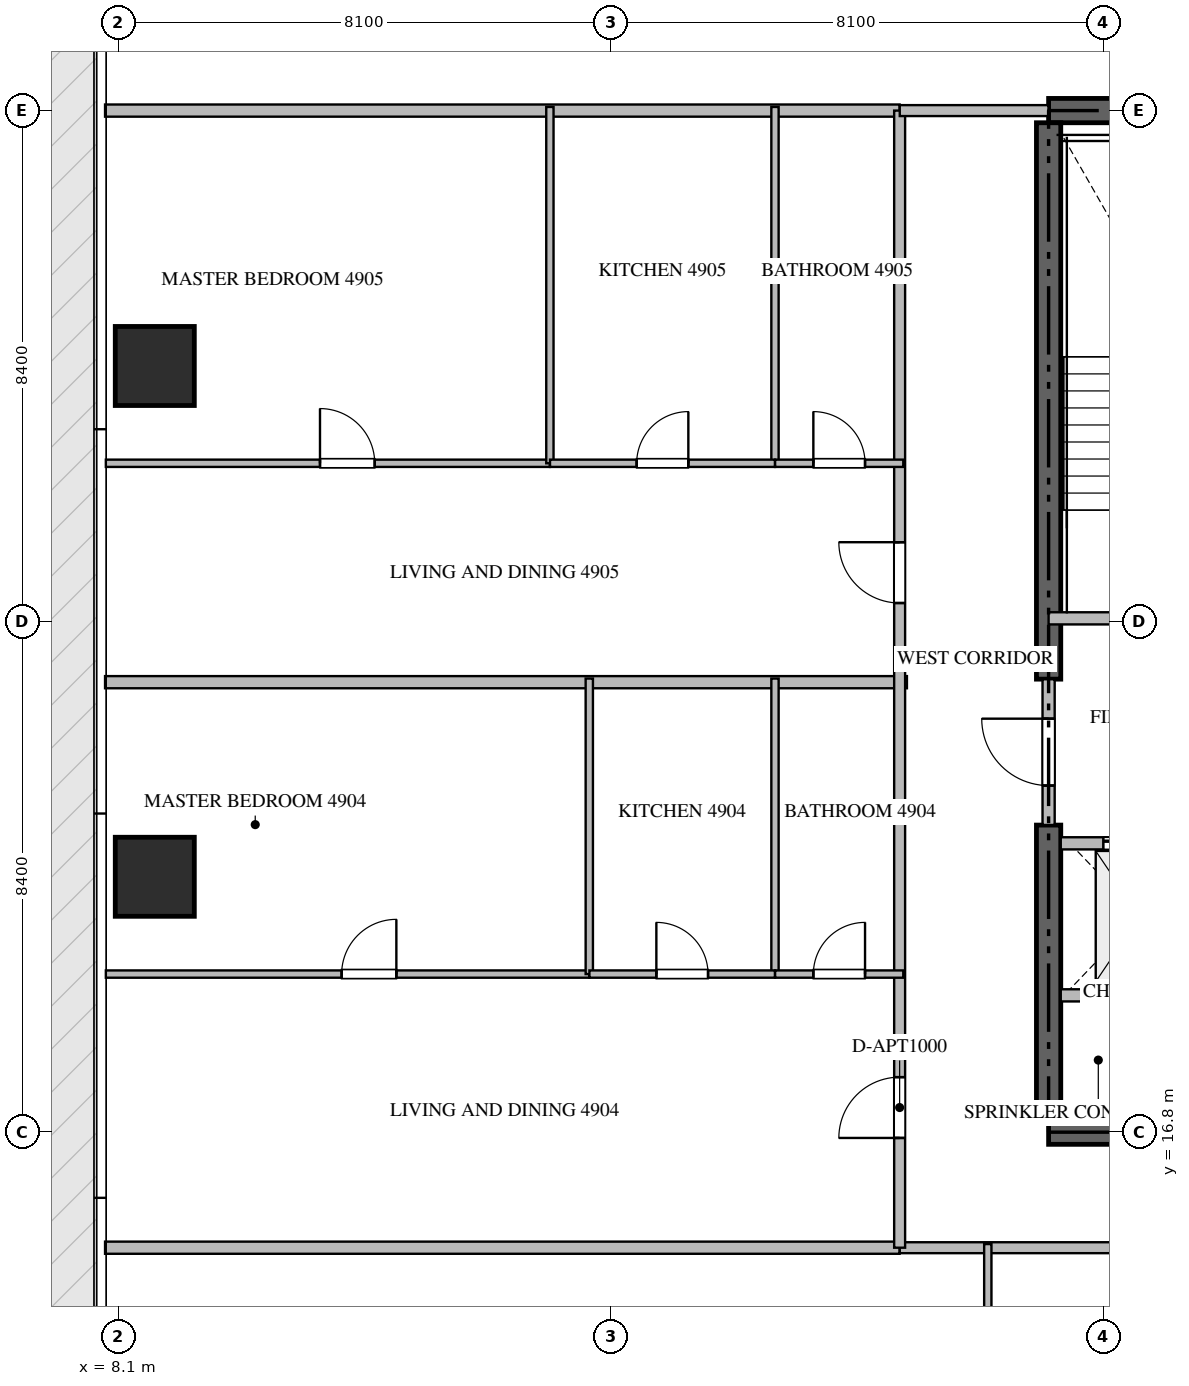
"""IFC4 building model, lengths in metres.
Left out: names, types, materials, properties, quantities, classifications, styles, units other than length and angle.
Written with IfcOpenShell. Run it as: python <this file> out.ifc"""

import sys

from ifc_helpers import new_model, si_unit, direction, frame, frame_2d, origin, origin_2d, place, context, subcontext, project, spatial, rectangle, extrude, source, transform, mapped, element, fill, save


model = new_model("IFC4")
c1 = context("Model", 3, precision=1e-05, world=origin(), true_north=direction((0.0, 1.0)))
c2 = subcontext(c1, "Body", "Model", "MODEL_VIEW")
j1 = project(units=[si_unit("LENGTHUNIT", "METRE"), si_unit("PLANEANGLEUNIT", "RADIAN")], contexts=[c1])
p1 = place(None, origin())
s1 = spatial("IfcSite", under=j1, at=p1, CompositionType="ELEMENT")
p2 = place(p1, origin())
s2 = spatial("IfcBuilding", under=s1, at=p2, CompositionType="ELEMENT")
p3 = place(p2, frame((0.0, 0.0, 195.15)))
s3 = spatial("IfcBuildingStorey", under=s2, at=p3, CompositionType="ELEMENT", Elevation=195.15)
for number, where, z_axis, x_axis in (
    (1, (23.4, 16.8, -0.26), (0.0, 0.0, 1.0), (1.0, 0.0, 0.0)),
    (2, (41.4, 33.6, -0.26), (0.0, 0.0, 1.0), (-1.0, 0.0, 0.0)),
):
    element("IfcWall", number, at=place(p3, frame(where, z_axis=z_axis, x_axis=x_axis)), inside=s3, PredefinedType="SHEAR", context=c2, shape_type="SweptSolid", body=[
        extrude(rectangle(XDim=18.0, YDim=0.4, at=frame_2d((9.0, 0.0))), origin(), (0.0, 0.0, 1.0), 3.568),
    ])
p4 = place(p3, frame((23.4, 17.0, -0.26), z_axis=(0.0, 0.0, 1.0), x_axis=(0.0, 1.0, 0.0)))
e3 = element("IfcWall", 3, at=p4, inside=s3, PredefinedType="SHEAR", context=c2, shape_type="SweptSolid", body=[
    extrude(rectangle(XDim=4.85, YDim=0.4, at=frame_2d((2.425, 0.0))), origin(), (0.0, 0.0, 1.0), 3.568),
])
p5 = place(p3, frame((23.4, 24.25, -0.26), z_axis=(0.0, 0.0, 1.0), x_axis=(0.0, 1.0, 0.0)))
e4 = element("IfcWall", 4, at=p5, inside=s3, PredefinedType="SHEAR", context=c2, shape_type="SweptSolid", body=[
    extrude(rectangle(XDim=9.15, YDim=0.4, at=frame_2d((4.575, 0.0))), origin(), (0.0, 0.0, 1.0), 3.568),
])
m1 = source(origin(), c2, "Body", "SweptSolid", [
    extrude(rectangle(XDim=1.3, YDim=1.3, at=origin_2d()), origin(), (0.0, 0.0, 1.0), 3.57),
])
for number, where, z_axis, x_axis in (
    (5, (8.7, 21.0, -0.26), (0.0, 0.0, 1.0), (1.0, 0.0, 0.0)),
    (6, (8.7, 29.4, -0.26), (0.0, 0.0, 1.0), (1.0, 0.0, 0.0)),
):
    element("IfcColumn", number, at=place(p3, frame(where, z_axis=z_axis, x_axis=x_axis)), inside=s3, PredefinedType="COLUMN", context=c2, shape_type="MappedRepresentation", body=[
        mapped(m1, transform((0.0, 0.0, 0.0), scale=1.0)),
    ])
p6 = place(p3, frame((23.4, 25.25, 0.0), z_axis=(0.0, 0.0, 1.0), x_axis=(1.0, 0.0, 0.0)))
e7 = element("IfcWall", 7, at=p6, inside=s3, PredefinedType="STANDARD", context=c2, shape_type="SweptSolid", body=[
    extrude(rectangle(XDim=4.45, YDim=0.2, at=frame_2d((2.225, 0.0))), origin(), (0.0, 0.0, 1.0), 3.31),
])
p7 = place(p6, frame((1.65, 0.0, 0.0)))
e8 = element("IfcOpeningElement", 8, at=p7, cuts=e7, PredefinedType="OPENING", context=c2, shape_type="SweptSolid", body=[
    extrude(rectangle(XDim=1.1, YDim=2.15, at=frame_2d((0.55, 1.075))), frame((0.0, 0.11, 0.0), z_axis=(0.0, -1.0, 0.0), x_axis=(1.0, 0.0, 0.0)), (0.0, 0.0, 1.0), 0.22),
])
p8 = place(p3, frame((23.6, 21.55, 0.0), z_axis=(0.0, 0.0, 1.0), x_axis=(1.0, 0.0, 0.0)))
e9 = element("IfcWall", 9, at=p8, inside=s3, PredefinedType="STANDARD", context=c2, shape_type="SweptSolid", body=[
    extrude(rectangle(XDim=2.45, YDim=0.2, at=frame_2d((1.225, 0.0))), origin(), (0.0, 0.0, 1.0), 3.31),
])
p9 = place(p8, frame((0.7, 0.0, 0.0)))
e10 = element("IfcOpeningElement", 10, at=p9, cuts=e9, PredefinedType="OPENING", context=c2, shape_type="SweptSolid", body=[
    extrude(rectangle(XDim=1.2, YDim=2.2, at=frame_2d((0.6, 1.1))), frame((0.0, 0.11, 0.0), z_axis=(0.0, -1.0, 0.0), x_axis=(1.0, 0.0, 0.0)), (0.0, 0.0, 1.0), 0.22),
])
p10 = place(p3, frame((23.6, 19.05, 0.0), z_axis=(0.0, 0.0, 1.0), x_axis=(1.0, 0.0, 0.0)))
e11 = element("IfcWall", 11, at=p10, inside=s3, PredefinedType="STANDARD", context=c2, shape_type="SweptSolid", body=[
    extrude(rectangle(XDim=2.45, YDim=0.2, at=frame_2d((1.225, 0.0))), origin(), (0.0, 0.0, 1.0), 3.31),
])
p11 = place(p3, frame((23.4, 21.852, 0.0), z_axis=(0.0, 0.0, 1.0), x_axis=(0.0, 1.0, 0.0)))
e12 = element("IfcWall", 12, at=p11, inside=s3, PredefinedType="STANDARD", context=c2, shape_type="SweptSolid", body=[
    extrude(rectangle(XDim=2.396, YDim=0.2, at=frame_2d((1.198, 0.0))), origin(), (0.0, 0.0, 1.0), 3.31),
])
p12 = place(p11, frame((0.648, 0.0, 0.0)))
e13 = element("IfcOpeningElement", 13, at=p12, cuts=e12, PredefinedType="OPENING", context=c2, shape_type="SweptSolid", body=[
    extrude(rectangle(XDim=1.1, YDim=2.15, at=frame_2d((0.55, 1.075))), frame((0.0, 0.11, 0.0), z_axis=(0.0, -1.0, 0.0), x_axis=(1.0, 0.0, 0.0)), (0.0, 0.0, 1.0), 0.22),
])
p13 = place(p3, frame((7.882, 24.2, 0.0), z_axis=(0.0, 0.0, 1.0), x_axis=(1.0, 0.0, 0.0)))
e14 = element("IfcWall", 14, at=p13, inside=s3, PredefinedType="PARTITIONING", context=c2, shape_type="SweptSolid", body=[
    extrude(rectangle(XDim=13.188, YDim=0.2, at=frame_2d((6.594, 0.0))), origin(), (0.0, 0.0, 1.0), 3.31),
])
for number, where, z_axis, x_axis in (
    (15, (7.882, 14.9, 0.0), (0.0, 0.0, 1.0), (1.0, 0.0, 0.0)),
    (16, (7.882, 33.6, 0.0), (0.0, 0.0, 1.0), (1.0, 0.0, 0.0)),
):
    element("IfcWall", number, at=place(p3, frame(where, z_axis=z_axis, x_axis=x_axis)), inside=s3, PredefinedType="PARTITIONING", context=c2, shape_type="SweptSolid", body=[
        extrude(rectangle(XDim=13.068, YDim=0.2, at=frame_2d((6.534, 0.0))), origin(), (0.0, 0.0, 1.0), 3.31),
    ])
p14 = place(p3, frame((20.952, 14.9, 0.0), z_axis=(0.0, 0.0, 1.0), x_axis=(1.0, 0.0, 0.0)))
e17 = element("IfcWall", 17, at=p14, inside=s3, PredefinedType="PARTITIONING", context=c2, shape_type="SweptSolid", body=[
    extrude(rectangle(XDim=22.896, YDim=0.18, at=frame_2d((11.448, 0.0))), origin(), (0.0, 0.0, 1.0), 2.145),
])
p15 = place(p14, frame((14.231, 0.0, 0.0)))
e18 = element("IfcOpeningElement", 18, at=p15, cuts=e17, PredefinedType="OPENING", context=c2, shape_type="SweptSolid", body=[
    extrude(rectangle(XDim=0.9, YDim=2.1, at=frame_2d((0.45, 1.05))), frame((0.0, 0.1, 0.0), z_axis=(0.0, -1.0, 0.0), x_axis=(1.0, 0.0, 0.0)), (0.0, 0.0, 1.0), 0.2),
])
p16 = place(p14, frame((19.203, 0.0, 0.0)))
e19 = element("IfcOpeningElement", 19, at=p16, cuts=e17, PredefinedType="OPENING", context=c2, shape_type="SweptSolid", body=[
    extrude(rectangle(XDim=0.9, YDim=2.1, at=frame_2d((0.45, 1.05))), frame((0.0, 0.1, 0.0), z_axis=(0.0, -1.0, 0.0), x_axis=(1.0, 0.0, 0.0)), (0.0, 0.0, 1.0), 0.2),
])
p17 = place(p3, frame((20.95, 14.9, 0.0), z_axis=(0.0, 0.0, 1.0), x_axis=(0.0, 1.0, 0.0)))
e20 = element("IfcWall", 20, at=p17, inside=s3, PredefinedType="PARTITIONING", context=c2, shape_type="SweptSolid", body=[
    extrude(rectangle(XDim=18.7, YDim=0.18, at=frame_2d((9.35, 0.0))), origin(), (0.0, 0.0, 1.0), 3.31),
])
p18 = place(p17, frame((1.805, 0.0, 0.0)))
e21 = element("IfcOpeningElement", 21, at=p18, cuts=e20, PredefinedType="OPENING", context=c2, shape_type="SweptSolid", body=[
    extrude(rectangle(XDim=1.0, YDim=2.15, at=frame_2d((0.5, 1.075))), frame((0.0, 0.1, 0.0), z_axis=(0.0, -1.0, 0.0), x_axis=(1.0, 0.0, 0.0)), (0.0, 0.0, 1.0), 0.2),
])
p19 = place(p17, frame((10.602, 0.0, 0.0)))
e22 = element("IfcOpeningElement", 22, at=p19, cuts=e20, PredefinedType="OPENING", context=c2, shape_type="SweptSolid", body=[
    extrude(rectangle(XDim=1.0, YDim=2.15, at=frame_2d((0.5, 1.075))), frame((0.0, 0.1, 0.0), z_axis=(0.0, -1.0, 0.0), x_axis=(1.0, 0.0, 0.0)), (0.0, 0.0, 1.0), 0.2),
])
p20 = place(p3, frame((20.952, 33.6, 0.0), z_axis=(0.0, 0.0, 1.0), x_axis=(1.0, 0.0, 0.0)))
e23 = element("IfcWall", 23, at=p20, inside=s3, PredefinedType="PARTITIONING", context=c2, shape_type="SweptSolid", body=[
    extrude(rectangle(XDim=2.446, YDim=0.18, at=frame_2d((1.223, 0.0))), origin(), (0.0, 0.0, 1.0), 3.31),
])
p21 = place(p3, frame((22.4, 12.752, 0.0), z_axis=(0.0, 0.0, 1.0), x_axis=(0.0, 1.0, 0.0)))
e24 = element("IfcWall", 24, at=p21, inside=s3, PredefinedType="PARTITIONING", context=c2, shape_type="SweptSolid", body=[
    extrude(rectangle(XDim=2.208, YDim=0.12, at=frame_2d((1.104, 0.0))), origin(), (0.0, 0.0, 1.0), 3.31),
])
p22 = place(p3, frame((7.895, 19.4, 0.0), z_axis=(0.0, 0.0, 1.0), x_axis=(1.0, 0.0, 0.0)))
e25 = element("IfcWall", 25, at=p22, inside=s3, PredefinedType="PARTITIONING", context=c2, shape_type="SweptSolid", body=[
    extrude(rectangle(XDim=7.951, YDim=0.12, at=frame_2d((3.976, 0.0))), origin(), (0.0, 0.0, 1.0), 3.31),
])
p23 = place(p22, frame((3.878, 0.0, 0.0)))
e26 = element("IfcOpeningElement", 26, at=p23, cuts=e25, PredefinedType="OPENING", context=c2, shape_type="SweptSolid", body=[
    extrude(rectangle(XDim=0.9, YDim=2.1, at=frame_2d((0.45, 1.05))), frame((0.0, 0.07, 0.0), z_axis=(0.0, -1.0, 0.0), x_axis=(1.0, 0.0, 0.0)), (0.0, 0.0, 1.0), 0.14),
])
for number, where, z_axis, x_axis in (
    (27, (15.846, 19.4, 0.0), (0.0, 0.0, 1.0), (0.0, 1.0, 0.0)),
    (28, (18.9, 19.4, 0.0), (0.0, 0.0, 1.0), (0.0, 1.0, 0.0)),
):
    element("IfcWall", number, at=place(p3, frame(where, z_axis=z_axis, x_axis=x_axis)), inside=s3, PredefinedType="PARTITIONING", context=c2, shape_type="SweptSolid", body=[
        extrude(rectangle(XDim=4.86, YDim=0.12, at=frame_2d((2.43, 0.0))), origin(), (0.0, 0.0, 1.0), 3.31),
    ])
p24 = place(p3, frame((15.848, 19.4, 0.0), z_axis=(0.0, 0.0, 1.0), x_axis=(1.0, 0.0, 0.0)))
e29 = element("IfcWall", 29, at=p24, inside=s3, PredefinedType="PARTITIONING", context=c2, shape_type="SweptSolid", body=[
    extrude(rectangle(XDim=3.052, YDim=0.12, at=frame_2d((1.526, 0.0))), origin(), (0.0, 0.0, 1.0), 3.31),
])
p25 = place(p24, frame((1.101, 0.0, 0.0)))
e30 = element("IfcOpeningElement", 30, at=p25, cuts=e29, PredefinedType="OPENING", context=c2, shape_type="SweptSolid", body=[
    extrude(rectangle(XDim=0.85, YDim=2.1, at=frame_2d((0.425, 1.05))), frame((0.0, 0.07, 0.0), z_axis=(0.0, -1.0, 0.0), x_axis=(1.0, 0.0, 0.0)), (0.0, 0.0, 1.0), 0.14),
])
p26 = place(p3, frame((18.902, 19.4, 0.0), z_axis=(0.0, 0.0, 1.0), x_axis=(1.0, 0.0, 0.0)))
e31 = element("IfcWall", 31, at=p26, inside=s3, PredefinedType="PARTITIONING", context=c2, shape_type="SweptSolid", body=[
    extrude(rectangle(XDim=2.108, YDim=0.12, at=frame_2d((1.054, 0.0))), origin(), (0.0, 0.0, 1.0), 3.31),
])
p27 = place(p26, frame((0.629, 0.0, 0.0)))
e32 = element("IfcOpeningElement", 32, at=p27, cuts=e31, PredefinedType="OPENING", context=c2, shape_type="SweptSolid", body=[
    extrude(rectangle(XDim=0.85, YDim=2.1, at=frame_2d((0.425, 1.05))), frame((0.0, 0.07, 0.0), z_axis=(0.0, -1.0, 0.0), x_axis=(1.0, 0.0, 0.0)), (0.0, 0.0, 1.0), 0.14),
])
p28 = place(p3, frame((7.895, 27.8, 0.0), z_axis=(0.0, 0.0, 1.0), x_axis=(1.0, 0.0, 0.0)))
e33 = element("IfcWall", 33, at=p28, inside=s3, PredefinedType="PARTITIONING", context=c2, shape_type="SweptSolid", body=[
    extrude(rectangle(XDim=7.303, YDim=0.12, at=frame_2d((3.651, 0.0))), origin(), (0.0, 0.0, 1.0), 3.31),
])
p29 = place(p28, frame((3.522, 0.0, 0.0)))
e34 = element("IfcOpeningElement", 34, at=p29, cuts=e33, PredefinedType="OPENING", context=c2, shape_type="SweptSolid", body=[
    extrude(rectangle(XDim=0.9, YDim=2.1, at=frame_2d((0.45, 1.05))), frame((0.0, 0.07, 0.0), z_axis=(0.0, -1.0, 0.0), x_axis=(1.0, 0.0, 0.0)), (0.0, 0.0, 1.0), 0.14),
])
for number, where, z_axis, x_axis in (
    (35, (15.198, 27.8, 0.0), (0.0, 0.0, 1.0), (0.0, 1.0, 0.0)),
    (36, (18.9, 27.8, 0.0), (0.0, 0.0, 1.0), (0.0, 1.0, 0.0)),
):
    element("IfcWall", number, at=place(p3, frame(where, z_axis=z_axis, x_axis=x_axis)), inside=s3, PredefinedType="PARTITIONING", context=c2, shape_type="SweptSolid", body=[
        extrude(rectangle(XDim=5.86, YDim=0.12, at=frame_2d((2.93, 0.0))), origin(), (0.0, 0.0, 1.0), 3.31),
    ])
p30 = place(p3, frame((15.2, 27.8, 0.0), z_axis=(0.0, 0.0, 1.0), x_axis=(1.0, 0.0, 0.0)))
e37 = element("IfcWall", 37, at=p30, inside=s3, PredefinedType="PARTITIONING", context=c2, shape_type="SweptSolid", body=[
    extrude(rectangle(XDim=3.7, YDim=0.12, at=frame_2d((1.85, 0.0))), origin(), (0.0, 0.0, 1.0), 3.31),
])
p31 = place(p30, frame((1.425, 0.0, 0.0)))
e38 = element("IfcOpeningElement", 38, at=p31, cuts=e37, PredefinedType="OPENING", context=c2, shape_type="SweptSolid", body=[
    extrude(rectangle(XDim=0.85, YDim=2.1, at=frame_2d((0.425, 1.05))), frame((0.0, 0.07, 0.0), z_axis=(0.0, -1.0, 0.0), x_axis=(1.0, 0.0, 0.0)), (0.0, 0.0, 1.0), 0.14),
])
p32 = place(p3, frame((18.902, 27.8, 0.0), z_axis=(0.0, 0.0, 1.0), x_axis=(1.0, 0.0, 0.0)))
e39 = element("IfcWall", 39, at=p32, inside=s3, PredefinedType="PARTITIONING", context=c2, shape_type="SweptSolid", body=[
    extrude(rectangle(XDim=2.108, YDim=0.12, at=frame_2d((1.054, 0.0))), origin(), (0.0, 0.0, 1.0), 3.31),
])
p33 = place(p32, frame((0.629, 0.0, 0.0)))
e40 = element("IfcOpeningElement", 40, at=p33, cuts=e39, PredefinedType="OPENING", context=c2, shape_type="SweptSolid", body=[
    extrude(rectangle(XDim=0.85, YDim=2.1, at=frame_2d((0.425, 1.05))), frame((0.0, 0.07, 0.0), z_axis=(0.0, -1.0, 0.0), x_axis=(1.0, 0.0, 0.0)), (0.0, 0.0, 1.0), 0.14),
])
m2 = source(origin(), c2, "Body", "SweptSolid", [
    extrude(rectangle(XDim=1.2, YDim=2.2, at=frame_2d((0.6, 1.1))), frame((0.0, 0.025, 0.0), z_axis=(0.0, -1.0, 0.0), x_axis=(1.0, 0.0, 0.0)), (0.0, 0.0, 1.0), 0.05),
])
p34 = place(p9, origin())
e41 = element("IfcDoor", 41, at=p34, inside=s3, OperationType="DOUBLE_DOOR_SLIDING", PredefinedType="DOOR", context=c2, shape_type="MappedRepresentation", body=[
    mapped(m2, transform((0.0, 0.0, 0.0), scale=1.0)),
])
fill(e10, e41)
m3 = source(origin(), c2, "Body", "SweptSolid", [
    extrude(rectangle(XDim=1.1, YDim=2.15, at=frame_2d((0.55, 1.075))), frame((0.0, 0.025, 0.0), z_axis=(0.0, -1.0, 0.0), x_axis=(1.0, 0.0, 0.0)), (0.0, 0.0, 1.0), 0.05),
])
p35 = place(p12, origin())
e42 = element("IfcDoor", 42, at=p35, inside=s3, OperationType="SINGLE_SWING_RIGHT", PredefinedType="DOOR", context=c2, shape_type="MappedRepresentation", body=[
    mapped(m3, transform((0.0, 0.0, 0.0), scale=1.0)),
])
fill(e13, e42)
m4 = source(origin(), c2, "Body", "SweptSolid", [
    extrude(rectangle(XDim=1.0, YDim=2.15, at=frame_2d((0.5, 1.075))), frame((0.0, 0.025, 0.0), z_axis=(0.0, -1.0, 0.0), x_axis=(1.0, 0.0, 0.0)), (0.0, 0.0, 1.0), 0.05),
])
p36 = place(p18, origin())
e43 = element("IfcDoor", 43, at=p36, inside=s3, OperationType="SINGLE_SWING_LEFT", PredefinedType="DOOR", context=c2, shape_type="MappedRepresentation", body=[
    mapped(m4, transform((0.0, 0.0, 0.0), scale=1.0)),
])
fill(e21, e43)
p37 = place(p19, origin())
e44 = element("IfcDoor", 44, at=p37, inside=s3, OperationType="SINGLE_SWING_RIGHT", PredefinedType="DOOR", context=c2, shape_type="MappedRepresentation", body=[
    mapped(m4, transform((0.0, 0.0, 0.0), scale=1.0)),
])
fill(e22, e44)
m5 = source(origin(), c2, "Body", "SweptSolid", [
    extrude(rectangle(XDim=0.9, YDim=2.1, at=frame_2d((0.45, 1.05))), frame((0.0, 0.025, 0.0), z_axis=(0.0, -1.0, 0.0), x_axis=(1.0, 0.0, 0.0)), (0.0, 0.0, 1.0), 0.05),
])
p38 = place(p23, origin())
e45 = element("IfcDoor", 45, at=p38, inside=s3, OperationType="SINGLE_SWING_RIGHT", PredefinedType="DOOR", context=c2, shape_type="MappedRepresentation", body=[
    mapped(m5, transform((0.0, 0.0, 0.0), scale=1.0)),
])
fill(e26, e45)
m6 = source(origin(), c2, "Body", "SweptSolid", [
    extrude(rectangle(XDim=0.85, YDim=2.1, at=frame_2d((0.425, 1.05))), frame((0.0, 0.025, 0.0), z_axis=(0.0, -1.0, 0.0), x_axis=(1.0, 0.0, 0.0)), (0.0, 0.0, 1.0), 0.05),
])
p39 = place(p25, origin())
e46 = element("IfcDoor", 46, at=p39, inside=s3, OperationType="SINGLE_SWING_LEFT", PredefinedType="DOOR", context=c2, shape_type="MappedRepresentation", body=[
    mapped(m6, transform((0.0, 0.0, 0.0), scale=1.0)),
])
fill(e30, e46)
p40 = place(p27, origin())
e47 = element("IfcDoor", 47, at=p40, inside=s3, OperationType="SINGLE_SWING_RIGHT", PredefinedType="DOOR", context=c2, shape_type="MappedRepresentation", body=[
    mapped(m6, transform((0.0, 0.0, 0.0), scale=1.0)),
])
fill(e32, e47)
p41 = place(p29, origin())
e48 = element("IfcDoor", 48, at=p41, inside=s3, OperationType="SINGLE_SWING_LEFT", PredefinedType="DOOR", context=c2, shape_type="MappedRepresentation", body=[
    mapped(m5, transform((0.0, 0.0, 0.0), scale=1.0)),
])
fill(e34, e48)
p42 = place(p31, origin())
e49 = element("IfcDoor", 49, at=p42, inside=s3, OperationType="SINGLE_SWING_RIGHT", PredefinedType="DOOR", context=c2, shape_type="MappedRepresentation", body=[
    mapped(m6, transform((0.0, 0.0, 0.0), scale=1.0)),
])
fill(e38, e49)
p43 = place(p33, origin())
e50 = element("IfcDoor", 50, at=p43, inside=s3, OperationType="SINGLE_SWING_LEFT", PredefinedType="DOOR", context=c2, shape_type="MappedRepresentation", body=[
    mapped(m6, transform((0.0, 0.0, 0.0), scale=1.0)),
])
fill(e40, e50)
save(model, sys.argv[1])
